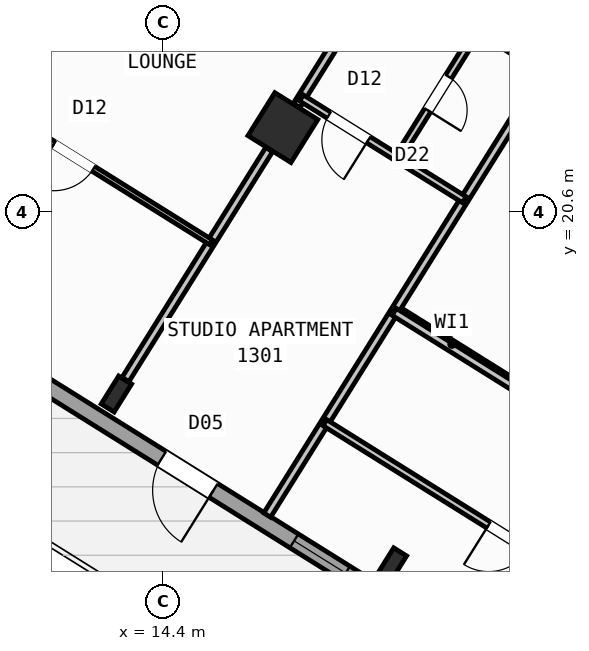
"""IFC4 building model, lengths in metres.
Left out: names, types, materials, properties, quantities, classifications, styles, units other than length and angle.
Written with IfcOpenShell. Run it as: python <this file> out.ifc"""

import sys

from ifc_helpers import new_model, si_unit, direction, frame, frame_2d, origin, origin_2d, place, context, subcontext, project, spatial, rectangle, hollow_rectangle, i_section, extrude, source, transform, mapped, element, fill, save


model = new_model("IFC4")
c1 = context("Model", 3, precision=1e-05, world=origin(), true_north=direction((0.0, 1.0)))
c2 = subcontext(c1, "Body", "Model", "MODEL_VIEW")
j1 = project(units=[si_unit("LENGTHUNIT", "METRE"), si_unit("PLANEANGLEUNIT", "RADIAN")], contexts=[c1])
p1 = place(None, origin())
s1 = spatial("IfcSite", under=j1, at=p1, CompositionType="ELEMENT")
p2 = place(p1, origin())
s2 = spatial("IfcBuilding", under=s1, at=p2, CompositionType="ELEMENT")
p3 = place(p2, frame((0.0, 0.0, 52.8)))
s3 = spatial("IfcBuildingStorey", under=s2, at=p3, CompositionType="ELEMENT", Elevation=52.8)
m1 = source(origin(), c2, "Body", "SweptSolid", [
    extrude(i_section(OverallWidth=0.3, OverallDepth=0.65, WebThickness=0.016, FlangeThickness=0.031, at=origin_2d()), origin(), (0.0, 0.0, 1.0), 3.6),
])
p4 = place(p3, frame((18.906, 13.612, 0.0), z_axis=(0.0, 0.0, 1.0), x_axis=(-0.848048096156, 0.529919264233, 0.0)))
e1 = element("IfcColumn", 1, at=p4, inside=s3, PredefinedType="COLUMN", context=c2, shape_type="MappedRepresentation", body=[
    mapped(m1, transform((0.0, 0.0, 0.0), scale=1.0)),
])
m2 = source(origin(), c2, "Body", "SweptSolid", [
    extrude(hollow_rectangle(XDim=1.0, YDim=1.0, WallThickness=0.04, at=origin_2d()), origin(), (0.0, 0.0, 1.0), 3.6),
])
p5 = place(p3, frame((16.764, 22.261, 0.0), z_axis=(0.0, 0.0, 1.0), x_axis=(-0.848048096156, 0.529919264233, 0.0)))
e2 = element("IfcColumn", 2, at=p5, inside=s3, PredefinedType="COLUMN", context=c2, shape_type="MappedRepresentation", body=[
    mapped(m2, transform((0.0, 0.0, 0.0), scale=1.0)),
])
p6 = place(p3, frame((13.478, 17.003, 0.0), z_axis=(0.0, 0.0, 1.0), x_axis=(-0.848048096156, 0.529919264233, 0.0)))
e3 = element("IfcColumn", 3, at=p6, inside=s3, PredefinedType="COLUMN", context=c2, shape_type="MappedRepresentation", body=[
    mapped(m1, transform((0.0, 0.0, 0.0), scale=1.0)),
])
p7 = place(p3, frame((29.268, 6.429, 0.0), z_axis=(0.0, 0.0, 1.0), x_axis=(-0.848049971435, 0.529916263149, 0.0)))
e4 = element("IfcWall", 4, at=p7, inside=s3, PredefinedType="STANDARD", context=c2, shape_type="SweptSolid", body=[
    extrude(rectangle(XDim=31.588, YDim=0.32, at=frame_2d((15.794, 0.0))), origin(), (0.0, 0.0, 1.0), 3.35),
])
p8 = place(p7, frame((16.362, 0.0, 0.0)))
e5 = element("IfcOpeningElement", 5, at=p8, cuts=e4, PredefinedType="OPENING", context=c2, shape_type="SweptSolid", body=[
    extrude(rectangle(XDim=1.2, YDim=2.15, at=frame_2d((0.6, 1.075))), frame((0.0, 0.17, 0.0), z_axis=(0.0, -1.0, 0.0), x_axis=(1.0, 0.0, 0.0)), (0.0, 0.0, 1.0), 0.34),
])
p9 = place(p7, frame((2.989, 0.0, 0.8)))
e6 = element("IfcOpeningElement", 6, at=p9, cuts=e4, PredefinedType="OPENING", context=c2, shape_type="SweptSolid", body=[
    extrude(rectangle(XDim=2.1, YDim=1.55, at=frame_2d((1.05, 0.775))), frame((0.0, 0.17, 0.0), z_axis=(0.0, -1.0, 0.0), x_axis=(1.0, 0.0, 0.0)), (0.0, 0.0, 1.0), 0.34),
])
p10 = place(p7, frame((8.359, 0.0, 0.8)))
e7 = element("IfcOpeningElement", 7, at=p10, cuts=e4, PredefinedType="OPENING", context=c2, shape_type="SweptSolid", body=[
    extrude(rectangle(XDim=2.1, YDim=1.55, at=frame_2d((1.05, 0.775))), frame((0.0, 0.17, 0.0), z_axis=(0.0, -1.0, 0.0), x_axis=(1.0, 0.0, 0.0)), (0.0, 0.0, 1.0), 0.34),
])
p11 = place(p7, frame((13.284, 0.0, 0.95)))
e8 = element("IfcOpeningElement", 8, at=p11, cuts=e4, PredefinedType="OPENING", context=c2, shape_type="SweptSolid", body=[
    extrude(rectangle(XDim=1.2, YDim=1.4, at=frame_2d((0.6, 0.7))), frame((0.0, 0.17, 0.0), z_axis=(0.0, -1.0, 0.0), x_axis=(1.0, 0.0, 0.0)), (0.0, 0.0, 1.0), 0.34),
])
p12 = place(p7, frame((20.259, 0.0, 0.95)))
e9 = element("IfcOpeningElement", 9, at=p12, cuts=e4, PredefinedType="OPENING", context=c2, shape_type="SweptSolid", body=[
    extrude(rectangle(XDim=1.2, YDim=1.4, at=frame_2d((0.6, 0.7))), frame((0.0, 0.17, 0.0), z_axis=(0.0, -1.0, 0.0), x_axis=(1.0, 0.0, 0.0)), (0.0, 0.0, 1.0), 0.34),
])
p13 = place(p7, frame((22.929, 0.0, 0.95)))
e10 = element("IfcOpeningElement", 10, at=p13, cuts=e4, PredefinedType="OPENING", context=c2, shape_type="SweptSolid", body=[
    extrude(rectangle(XDim=1.2, YDim=1.4, at=frame_2d((0.6, 0.7))), frame((0.0, 0.17, 0.0), z_axis=(0.0, -1.0, 0.0), x_axis=(1.0, 0.0, 0.0)), (0.0, 0.0, 1.0), 0.34),
])
p14 = place(p7, frame((26.106, 0.0, 0.85)))
e11 = element("IfcOpeningElement", 11, at=p14, cuts=e4, PredefinedType="OPENING", context=c2, shape_type="SweptSolid", body=[
    extrude(rectangle(XDim=1.5, YDim=1.5, at=frame_2d((0.75, 0.75))), frame((0.0, 0.17, 0.0), z_axis=(0.0, -1.0, 0.0), x_axis=(1.0, 0.0, 0.0)), (0.0, 0.0, 1.0), 0.34),
])
p15 = place(p7, frame((29.068, 0.0, 0.85)))
e12 = element("IfcOpeningElement", 12, at=p15, cuts=e4, PredefinedType="OPENING", context=c2, shape_type="SweptSolid", body=[
    extrude(rectangle(XDim=1.8, YDim=1.5, at=frame_2d((0.9, 0.75))), frame((0.0, 0.17, 0.0), z_axis=(0.0, -1.0, 0.0), x_axis=(1.0, 0.0, 0.0)), (0.0, 0.0, 1.0), 0.34),
])
p16 = place(p3, frame((2.415, 23.452, 0.0), z_axis=(0.0, 0.0, 1.0), x_axis=(0.52991049553, 0.848053575387, 0.0)))
e13 = element("IfcWall", 13, at=p16, inside=s3, PredefinedType="STANDARD", context=c2, shape_type="SweptSolid", body=[
    extrude(rectangle(XDim=21.587, YDim=0.32, at=frame_2d((10.794, 0.0))), origin(), (0.0, 0.0, 1.0), 2.725),
])
p17 = place(p16, frame((2.356, 0.0, 0.8)))
e14 = element("IfcOpeningElement", 14, at=p17, cuts=e13, PredefinedType="OPENING", context=c2, shape_type="SweptSolid", body=[
    extrude(rectangle(XDim=2.1, YDim=1.55, at=frame_2d((1.05, 0.775))), frame((0.0, 0.17, 0.0), z_axis=(0.0, -1.0, 0.0), x_axis=(1.0, 0.0, 0.0)), (0.0, 0.0, 1.0), 0.34),
])
p18 = place(p16, frame((8.639, 0.0, 1.0)))
e15 = element("IfcOpeningElement", 15, at=p18, cuts=e13, PredefinedType="OPENING", context=c2, shape_type="SweptSolid", body=[
    extrude(rectangle(XDim=0.9, YDim=1.25, at=frame_2d((0.45, 0.625))), frame((0.0, 0.17, 0.0), z_axis=(0.0, -1.0, 0.0), x_axis=(1.0, 0.0, 0.0)), (0.0, 0.0, 1.0), 0.34),
])
p19 = place(p16, frame((17.129, 0.0, 0.85)))
e16 = element("IfcOpeningElement", 16, at=p19, cuts=e13, PredefinedType="OPENING", context=c2, shape_type="SweptSolid", body=[
    extrude(rectangle(XDim=1.5, YDim=1.5, at=frame_2d((0.75, 0.75))), frame((0.0, 0.17, 0.0), z_axis=(0.0, -1.0, 0.0), x_axis=(1.0, 0.0, 0.0)), (0.0, 0.0, 1.0), 0.34),
])
p20 = place(p3, frame((21.206, 17.292, 0.0), z_axis=(0.0, 0.0, 1.0), x_axis=(-0.848050851465, 0.529914854792, 0.0)))
e17 = element("IfcWall", 17, at=p20, inside=s3, PredefinedType="PARTITIONING", context=c2, shape_type="SweptSolid", body=[
    extrude(rectangle(XDim=2.61, YDim=0.16, at=frame_2d((1.305, 0.0))), origin(), (0.0, 0.0, 1.0), 3.34),
])
p21 = place(p3, frame((21.938, 23.391, 0.0), z_axis=(0.0, 0.0, 1.0), x_axis=(-0.529924725692, -0.848044683434, 0.0)))
e18 = element("IfcWall", 18, at=p21, inside=s3, PredefinedType="PARTITIONING", context=c2, shape_type="SweptSolid", body=[
    extrude(rectangle(XDim=10.35, YDim=0.16, at=frame_2d((5.175, 0.0))), origin(), (0.0, 0.0, 1.0), 3.34),
])
p22 = place(p3, frame((21.938, 23.391, 0.0), z_axis=(0.0, 0.0, 1.0), x_axis=(-0.848045850158, 0.529922858565, 0.0)))
e19 = element("IfcWall", 19, at=p22, inside=s3, PredefinedType="PARTITIONING", context=c2, shape_type="SweptSolid", body=[
    extrude(rectangle(XDim=16.73, YDim=0.16, at=frame_2d((8.365, 0.0))), origin(), (0.0, 0.0, 1.0), 3.34),
])
p23 = place(p22, frame((2.22, 0.0, 0.0)))
e20 = element("IfcOpeningElement", 20, at=p23, cuts=e19, PredefinedType="OPENING", context=c2, shape_type="SweptSolid", body=[
    extrude(rectangle(XDim=0.86, YDim=2.05, at=frame_2d((0.43, 1.025))), frame((0.0, 0.09, 0.0), z_axis=(0.0, -1.0, 0.0), x_axis=(1.0, 0.0, 0.0)), (0.0, 0.0, 1.0), 0.18),
])
p24 = place(p22, frame((6.49, 0.0, 0.0)))
e21 = element("IfcOpeningElement", 21, at=p24, cuts=e19, PredefinedType="OPENING", context=c2, shape_type="SweptSolid", body=[
    extrude(rectangle(XDim=1.0, YDim=2.1, at=frame_2d((0.5, 1.05))), frame((0.0, 0.09, 0.0), z_axis=(0.0, -1.0, 0.0), x_axis=(1.0, 0.0, 0.0)), (0.0, 0.0, 1.0), 0.18),
])
p25 = place(p22, frame((11.14, 0.0, 0.0)))
e22 = element("IfcOpeningElement", 22, at=p25, cuts=e19, PredefinedType="OPENING", context=c2, shape_type="SweptSolid", body=[
    extrude(rectangle(XDim=1.0, YDim=2.1, at=frame_2d((0.5, 1.05))), frame((0.0, 0.09, 0.0), z_axis=(0.0, -1.0, 0.0), x_axis=(1.0, 0.0, 0.0)), (0.0, 0.0, 1.0), 0.18),
])
p26 = place(p3, frame((18.724, 25.399, 0.0), z_axis=(0.0, 0.0, 1.0), x_axis=(-0.529930102756, -0.848041323399, 0.0)))
e23 = element("IfcWall", 23, at=p26, inside=s3, PredefinedType="PARTITIONING", context=c2, shape_type="SweptSolid", body=[
    extrude(rectangle(XDim=3.188, YDim=0.16, at=frame_2d((1.594, 0.0))), origin(), (0.0, 0.0, 1.0), 2.725),
])
p27 = place(p3, frame((16.492, 21.827, 0.0), z_axis=(0.0, 0.0, 1.0), x_axis=(-0.529904608059, -0.848057254175, 0.0)))
e24 = element("IfcWall", 24, at=p27, inside=s3, PredefinedType="PARTITIONING", context=c2, shape_type="SweptSolid", body=[
    extrude(rectangle(XDim=5.351, YDim=0.16, at=frame_2d((2.675, 0.0))), origin(), (0.0, 0.0, 1.0), 2.725),
])
p28 = place(p3, frame((20.343, 20.838, 0.0), z_axis=(0.0, 0.0, 1.0), x_axis=(-0.848059820872, 0.529900500304, 0.0)))
e25 = element("IfcWall", 25, at=p28, inside=s3, PredefinedType="PLUMBINGWALL", context=c2, shape_type="SweptSolid", body=[
    extrude(rectangle(XDim=3.79, YDim=0.14, at=frame_2d((1.895, 0.0))), origin(), (0.0, 0.0, 1.0), 3.34),
])
p29 = place(p28, frame((2.23, 0.0, 0.0)))
e26 = element("IfcOpeningElement", 26, at=p29, cuts=e25, PredefinedType="OPENING", context=c2, shape_type="SweptSolid", body=[
    extrude(rectangle(XDim=0.92, YDim=2.08, at=frame_2d((0.46, 1.04))), frame((0.0, 0.08, 0.0), z_axis=(0.0, -1.0, 0.0), x_axis=(1.0, 0.0, 0.0)), (0.0, 0.0, 1.0), 0.16),
])
p30 = place(p3, frame((20.624, 24.212, 0.0), z_axis=(0.0, 0.0, 1.0), x_axis=(-0.529940615993, -0.848034753722, 0.0)))
e27 = element("IfcWall", 27, at=p30, inside=s3, PredefinedType="PLUMBINGWALL", context=c2, shape_type="SweptSolid", body=[
    extrude(rectangle(XDim=3.01, YDim=0.14, at=frame_2d((1.505, 0.0))), origin(), (0.0, 0.0, 1.0), 2.995),
])
p31 = place(p30, frame((1.115, 0.0, 0.0)))
e28 = element("IfcOpeningElement", 28, at=p31, cuts=e27, PredefinedType="OPENING", context=c2, shape_type="SweptSolid", body=[
    extrude(rectangle(XDim=0.78, YDim=2.05, at=frame_2d((0.39, 1.025))), frame((0.0, 0.08, 0.0), z_axis=(0.0, -1.0, 0.0), x_axis=(1.0, 0.0, 0.0)), (0.0, 0.0, 1.0), 0.16),
])
p32 = place(p3, frame((15.348, 19.995, 0.0), z_axis=(0.0, 0.0, 1.0), x_axis=(-0.848056163074, 0.529906354247, 0.0)))
e29 = element("IfcWall", 29, at=p32, inside=s3, PredefinedType="PARTITIONING", context=c2, shape_type="SweptSolid", body=[
    extrude(rectangle(XDim=6.4, YDim=0.11, at=frame_2d((3.2, 0.0))), origin(), (0.0, 0.0, 1.0), 3.34),
])
p33 = place(p32, frame((2.74, 0.0, 0.0)))
e30 = element("IfcOpeningElement", 30, at=p33, cuts=e29, PredefinedType="OPENING", context=c2, shape_type="SweptSolid", body=[
    extrude(rectangle(XDim=0.92, YDim=2.08, at=frame_2d((0.46, 1.04))), frame((0.0, 0.065, 0.0), z_axis=(0.0, -1.0, 0.0), x_axis=(1.0, 0.0, 0.0)), (0.0, 0.0, 1.0), 0.13),
])
p34 = place(p3, frame((32.164, 10.374, 0.0), z_axis=(0.0, 0.0, 1.0), x_axis=(-0.848044107957, 0.529925646633, 0.0)))
e31 = element("IfcWall", 31, at=p34, inside=s3, PredefinedType="PARTITIONING", context=c2, shape_type="SweptSolid", body=[
    extrude(rectangle(XDim=15.57, YDim=0.16, at=frame_2d((7.785, 0.0))), origin(), (0.0, 0.0, 1.0), 3.34),
])
p35 = place(p34, frame((10.83, 0.0, 0.0)))
e32 = element("IfcOpeningElement", 32, at=p35, cuts=e31, PredefinedType="OPENING", context=c2, shape_type="SweptSolid", body=[
    extrude(rectangle(XDim=1.0, YDim=2.1, at=frame_2d((0.5, 1.05))), frame((0.0, 0.09, 0.0), z_axis=(0.0, -1.0, 0.0), x_axis=(1.0, 0.0, 0.0)), (0.0, 0.0, 1.0), 0.18),
])
p36 = place(p3, frame((29.72, 8.859, 0.0), z_axis=(0.0, 0.0, 1.0), x_axis=(-0.848049134363, 0.529917602752, 0.0)))
e33 = element("IfcWall", 33, at=p36, inside=s3, PredefinedType="PLUMBINGWALL", context=c2, shape_type="SweptSolid", body=[
    extrude(rectangle(XDim=14.3, YDim=0.14, at=frame_2d((7.15, 0.0))), origin(), (0.0, 0.0, 1.0), 3.34),
])
p37 = place(p36, frame((9.57, 0.0, 0.0)))
e34 = element("IfcOpeningElement", 34, at=p37, cuts=e33, PredefinedType="OPENING", context=c2, shape_type="SweptSolid", body=[
    extrude(rectangle(XDim=0.92, YDim=2.08, at=frame_2d((0.46, 1.04))), frame((0.0, 0.08, 0.0), z_axis=(0.0, -1.0, 0.0), x_axis=(1.0, 0.0, 0.0)), (0.0, 0.0, 1.0), 0.16),
])
m3 = source(origin(), c2, "Body", "SweptSolid", [
    extrude(rectangle(XDim=1.2, YDim=2.15, at=frame_2d((0.6, 1.075))), frame((0.0, 0.025, 0.0), z_axis=(0.0, -1.0, 0.0), x_axis=(1.0, 0.0, 0.0)), (0.0, 0.0, 1.0), 0.05),
])
p38 = place(p8, origin())
e35 = element("IfcDoor", 35, at=p38, inside=s3, OperationType="SINGLE_SWING_LEFT", PredefinedType="DOOR", context=c2, shape_type="MappedRepresentation", body=[
    mapped(m3, transform((0.0, 0.0, 0.0), scale=1.0)),
])
fill(e5, e35)
m4 = source(origin(), c2, "Body", "SweptSolid", [
    extrude(rectangle(XDim=1.2, YDim=1.4, at=frame_2d((0.6, 0.7))), frame((0.0, 0.03, 0.0), z_axis=(0.0, -1.0, 0.0), x_axis=(1.0, 0.0, 0.0)), (0.0, 0.0, 1.0), 0.06),
])
p39 = place(p11, origin())
e36 = element("IfcWindow", 36, at=p39, inside=s3, PartitioningType="SINGLE_PANEL", PredefinedType="WINDOW", context=c2, shape_type="MappedRepresentation", body=[
    mapped(m4, transform((0.0, 0.0, 0.0), scale=1.0)),
])
fill(e8, e36)
m5 = source(origin(), c2, "Body", "SweptSolid", [
    extrude(rectangle(XDim=0.92, YDim=2.08, at=frame_2d((0.46, 1.04))), frame((0.0, 0.025, 0.0), z_axis=(0.0, -1.0, 0.0), x_axis=(1.0, 0.0, 0.0)), (0.0, 0.0, 1.0), 0.05),
])
p40 = place(p29, origin())
e37 = element("IfcDoor", 37, at=p40, inside=s3, OperationType="SINGLE_SWING_LEFT", PredefinedType="DOOR", context=c2, shape_type="MappedRepresentation", body=[
    mapped(m5, transform((0.0, 0.0, 0.0), scale=1.0)),
])
fill(e26, e37)
m6 = source(origin(), c2, "Body", "SweptSolid", [
    extrude(rectangle(XDim=0.78, YDim=2.05, at=frame_2d((0.39, 1.025))), frame((0.0, 0.025, 0.0), z_axis=(0.0, -1.0, 0.0), x_axis=(1.0, 0.0, 0.0)), (0.0, 0.0, 1.0), 0.05),
])
p41 = place(p31, origin())
e38 = element("IfcDoor", 38, at=p41, inside=s3, OperationType="SINGLE_SWING_RIGHT", PredefinedType="DOOR", context=c2, shape_type="MappedRepresentation", body=[
    mapped(m6, transform((0.0, 0.0, 0.0), scale=1.0)),
])
fill(e28, e38)
p42 = place(p33, origin())
e39 = element("IfcDoor", 39, at=p42, inside=s3, OperationType="SINGLE_SWING_RIGHT", PredefinedType="DOOR", context=c2, shape_type="MappedRepresentation", body=[
    mapped(m5, transform((0.0, 0.0, 0.0), scale=1.0)),
])
fill(e30, e39)
p43 = place(p37, origin())
e40 = element("IfcDoor", 40, at=p43, inside=s3, OperationType="SINGLE_SWING_RIGHT", PredefinedType="DOOR", context=c2, shape_type="MappedRepresentation", body=[
    mapped(m5, transform((0.0, 0.0, 0.0), scale=1.0)),
])
fill(e34, e40)
save(model, sys.argv[1])
